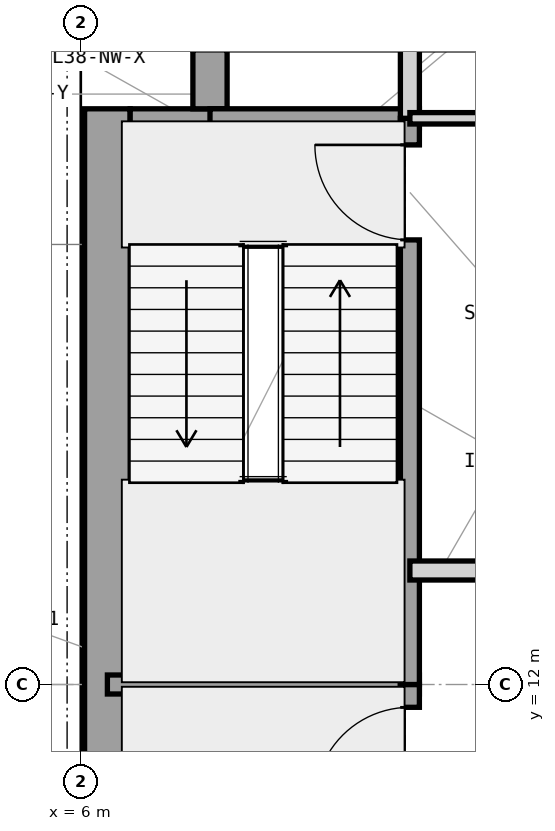
"""IFC4 building model, lengths in metres.
Left out: names, types, materials, properties, quantities, classifications, styles, units other than length and angle.
Written with IfcOpenShell. Run it as: python <this file> out.ifc"""

import sys

from ifc_helpers import new_model, si_unit, direction, frame, frame_2d, origin, place, context, subcontext, project, spatial, rectangle, extrude, element, fill, save


model = new_model("IFC4")
c1 = context("Model", 3, precision=1e-05, world=origin(), true_north=direction((0.0, 1.0)))
c2 = subcontext(c1, "Body", "Model", "MODEL_VIEW")
j1 = project(units=[si_unit("LENGTHUNIT", "METRE"), si_unit("PLANEANGLEUNIT", "RADIAN")], contexts=[c1])
p1 = place(None, origin())
s1 = spatial("IfcSite", under=j1, at=p1, CompositionType="ELEMENT")
p2 = place(p1, origin())
s2 = spatial("IfcBuilding", under=s1, at=p2, CompositionType="ELEMENT")
p3 = place(p2, frame((0.0, 0.0, 160.2)))
s3 = spatial("IfcBuildingStorey", under=s2, at=p3, CompositionType="ELEMENT", Elevation=160.2)
p4 = place(p3, frame((6.35, 4.425, 0.0), z_axis=(0.0, 0.0, 1.0), x_axis=(0.0, 1.0, 0.0)))
e1 = element("IfcWall", 1, at=p4, inside=s3, PredefinedType="SHEAR", context=c2, shape_type="SweptSolid", body=[
    extrude(rectangle(XDim=15.15, YDim=0.6, at=frame_2d((7.575, 0.0))), origin(), (0.0, 0.0, 1.0), 4.2),
])
p5 = place(p3, frame((6.65, 19.35, 0.0), z_axis=(0.0, 0.0, 1.0), x_axis=(1.0, 0.0, 0.0)))
e2 = element("IfcWall", 2, at=p5, inside=s3, PredefinedType="SHEAR", context=c2, shape_type="SweptSolid", body=[
    extrude(rectangle(XDim=1.275, YDim=0.45, at=frame_2d((0.638, 0.0))), origin(), (0.0, 0.0, 1.0), 4.2),
])
p6 = place(p3, frame((7.7, 19.575, 0.0), z_axis=(0.0, 0.0, 1.0), x_axis=(0.0, 1.0, 0.0)))
e3 = element("IfcWall", 3, at=p6, inside=s3, PredefinedType="SHEAR", context=c2, shape_type="SweptSolid", body=[
    extrude(rectangle(XDim=0.775, YDim=0.45, at=frame_2d((0.388, 0.0))), origin(), (0.0, 0.0, 1.0), 4.2),
])
p7 = place(p3, frame((6.35, 12.0, 0.0), z_axis=(0.0, 0.0, 1.0), x_axis=(1.0, 0.0, 0.0)))
e4 = element("IfcWall", 4, at=p7, inside=s3, PredefinedType="SHEAR", context=c2, shape_type="SweptSolid", body=[
    extrude(rectangle(XDim=4.105, YDim=0.25, at=frame_2d((2.052, 0.0))), origin(), (0.0, 0.0, 1.0), 4.2),
])
p8 = place(p3, frame((7.7, 19.45, 0.0), z_axis=(0.0, 0.0, 1.0), x_axis=(1.0, 0.0, 0.0)))
e5 = element("IfcWall", 5, at=p8, inside=s3, PredefinedType="SHEAR", context=c2, shape_type="SweptSolid", body=[
    extrude(rectangle(XDim=2.755, YDim=0.25, at=frame_2d((1.377, 0.0))), origin(), (0.0, 0.0, 1.0), 4.2),
])
p9 = place(p3, frame((10.33, 4.55, 0.0), z_axis=(0.0, 0.0, 1.0), x_axis=(0.0, 1.0, 0.0)))
e6 = element("IfcWall", 6, at=p9, inside=s3, PredefinedType="SHEAR", context=c2, shape_type="SweptSolid", body=[
    extrude(rectangle(XDim=7.45, YDim=0.25, at=frame_2d((3.725, 0.0))), origin(), (0.0, 0.0, 1.0), 4.2),
])
p10 = place(p9, frame((5.9, 0.0, 0.0)))
e7 = element("IfcOpeningElement", 7, at=p10, cuts=e6, PredefinedType="OPENING", context=c2, shape_type="SweptSolid", body=[
    extrude(rectangle(XDim=1.25, YDim=2.2, at=frame_2d((0.625, 1.1))), frame((0.0, 0.135, 0.0), z_axis=(0.0, -1.0, 0.0), x_axis=(1.0, 0.0, 0.0)), (0.0, 0.0, 1.0), 0.27),
])
p11 = place(p3, frame((10.33, 12.0, 0.0), z_axis=(0.0, 0.0, 1.0), x_axis=(0.0, 1.0, 0.0)))
e8 = element("IfcWall", 8, at=p11, inside=s3, PredefinedType="SHEAR", context=c2, shape_type="SweptSolid", body=[
    extrude(rectangle(XDim=7.45, YDim=0.25, at=frame_2d((3.725, 0.0))), origin(), (0.0, 0.0, 1.0), 4.2),
])
p12 = place(p11, frame((5.85, 0.0, 0.0)))
e9 = element("IfcOpeningElement", 9, at=p12, cuts=e8, PredefinedType="OPENING", context=c2, shape_type="SweptSolid", body=[
    extrude(rectangle(XDim=1.25, YDim=2.2, at=frame_2d((0.625, 1.1))), frame((0.0, 0.135, 0.0), z_axis=(0.0, -1.0, 0.0), x_axis=(1.0, 0.0, 0.0)), (0.0, 0.0, 1.0), 0.27),
])
p13 = place(p3, frame((10.33, 19.45, 0.0), z_axis=(0.0, 0.0, 1.0), x_axis=(0.0, 1.0, 0.0)))
e10 = element("IfcWall", 10, at=p13, inside=s3, PredefinedType="PARTITIONING", context=c2, shape_type="SweptSolid", body=[
    extrude(rectangle(XDim=1.2, YDim=0.25, at=frame_2d((0.6, 0.0))), origin(), (0.0, 0.0, 1.0), 3.373),
])
p14 = place(p3, frame((10.33, 13.5, 0.0), z_axis=(0.0, 0.0, 1.0), x_axis=(1.0, 0.0, 0.0)))
e11 = element("IfcWall", 11, at=p14, inside=s3, PredefinedType="PARTITIONING", context=c2, shape_type="SweptSolid", body=[
    extrude(rectangle(XDim=1.62, YDim=0.25, at=frame_2d((0.81, 0.0))), origin(), (0.0, 0.0, 1.0), 3.583),
])
p15 = place(p3, frame((10.33, 19.45, 0.0), z_axis=(0.0, 0.0, 1.0), x_axis=(1.0, 0.0, 0.0)))
e12 = element("IfcWall", 12, at=p15, inside=s3, PredefinedType="PARTITIONING", context=c2, shape_type="SweptSolid", body=[
    extrude(rectangle(XDim=3.82, YDim=0.15, at=frame_2d((1.91, 0.0))), origin(), (0.0, 0.0, 1.0), 3.93),
])
p16 = place(p15, frame((1.25, 0.0, 0.0)))
e13 = element("IfcOpeningElement", 13, at=p16, cuts=e12, PredefinedType="OPENING", context=c2, shape_type="SweptSolid", body=[
    extrude(rectangle(XDim=0.95, YDim=2.1, at=frame_2d((0.475, 1.05))), frame((0.0, 0.085, 0.0), z_axis=(0.0, -1.0, 0.0), x_axis=(1.0, 0.0, 0.0)), (0.0, 0.0, 1.0), 0.17),
])
p17 = place(p10, origin())
e14 = element("IfcDoor", 14, at=p17, inside=s3, OperationType="SINGLE_SWING_LEFT", PredefinedType="DOOR", context=c2, shape_type="SweptSolid", body=[
    extrude(rectangle(XDim=1.25, YDim=2.2, at=frame_2d((0.625, 1.1))), frame((0.0, 0.025, 0.0), z_axis=(0.0, -1.0, 0.0), x_axis=(1.0, 0.0, 0.0)), (0.0, 0.0, 1.0), 0.05),
])
fill(e7, e14)
p18 = place(p12, origin())
e15 = element("IfcDoor", 15, at=p18, inside=s3, OperationType="SINGLE_SWING_RIGHT", PredefinedType="DOOR", context=c2, shape_type="SweptSolid", body=[
    extrude(rectangle(XDim=1.25, YDim=2.2, at=frame_2d((0.625, 1.1))), frame((0.0, 0.025, 0.0), z_axis=(0.0, -1.0, 0.0), x_axis=(1.0, 0.0, 0.0)), (0.0, 0.0, 1.0), 0.05),
])
fill(e9, e15)
save(model, sys.argv[1])
